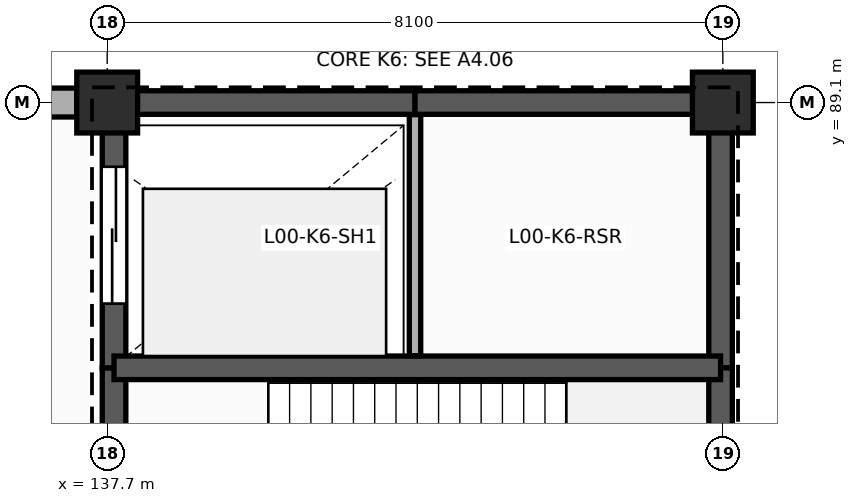
"""IFC4 building model, lengths in metres.
Left out: names, types, materials, properties, quantities, classifications, styles, units other than length and angle.
Written with IfcOpenShell. Run it as: python <this file> out.ifc"""

import sys

from ifc_helpers import new_model, si_unit, direction, frame, frame_2d, origin, origin_2d, place, context, subcontext, project, spatial, rectangle, extrude, element, fill, save


model = new_model("IFC4")
c1 = context("Model", 3, precision=1e-05, world=origin(), true_north=direction((0.0, 1.0)))
c2 = subcontext(c1, "Body", "Model", "MODEL_VIEW")
j1 = project(units=[si_unit("LENGTHUNIT", "METRE"), si_unit("PLANEANGLEUNIT", "RADIAN")], contexts=[c1])
p1 = place(None, origin())
s1 = spatial("IfcSite", under=j1, at=p1, CompositionType="ELEMENT")
p2 = place(p1, origin())
s2 = spatial("IfcBuilding", under=s1, at=p2, CompositionType="ELEMENT")
p3 = place(p2, origin())
s3 = spatial("IfcBuildingStorey", under=s2, at=p3, CompositionType="ELEMENT", Elevation=0.0)
for number, where, z_axis, x_axis in (
    (1, (137.7, 89.1, 0.0), (0.0, 0.0, 1.0), (1.0, 0.0, 0.0)),
    (2, (145.8, 89.1, 0.0), (0.0, 0.0, 1.0), (1.0, 0.0, 0.0)),
):
    element("IfcColumn", number, at=place(p3, frame(where, z_axis=z_axis, x_axis=x_axis)), inside=s3, PredefinedType="COLUMN", context=c2, shape_type="SweptSolid", body=[
        extrude(rectangle(XDim=0.8, YDim=0.8, at=origin_2d()), origin(), (0.0, 0.0, 1.0), 5.4),
    ])
p4 = place(p3, frame((130.0, 89.1, 0.0), z_axis=(0.0, 0.0, 1.0), x_axis=(1.0, 0.0, 0.0)))
e3 = element("IfcWall", 3, at=p4, inside=s3, PredefinedType="SOLIDWALL", context=c2, shape_type="SweptSolid", body=[
    extrude(rectangle(XDim=7.3, YDim=0.38, at=frame_2d((3.65, 0.0))), origin(), (0.0, 0.0, 1.0), 4.707),
])
p5 = place(p3, frame((137.79, 81.25, 0.0), z_axis=(0.0, 0.0, 1.0), x_axis=(0.0, 1.0, 0.0)))
e4 = element("IfcWall", 4, at=p5, inside=s3, PredefinedType="SHEAR", context=c2, shape_type="SweptSolid", body=[
    extrude(rectangle(XDim=4.36, YDim=0.31, at=frame_2d((2.18, 0.0))), origin(), (0.0, 0.0, 1.0), 5.4),
])
p6 = place(p5, frame((1.35, 0.0, 0.0)))
e5 = element("IfcOpeningElement", 5, at=p6, cuts=e4, PredefinedType="OPENING", context=c2, shape_type="SweptSolid", body=[
    extrude(rectangle(XDim=1.2, YDim=2.25, at=frame_2d((0.6, 1.125))), frame((0.0, 0.165, 0.0), z_axis=(0.0, -1.0, 0.0), x_axis=(1.0, 0.0, 0.0)), (0.0, 0.0, 1.0), 0.33),
])
p7 = place(p3, frame((137.79, 85.61, 0.0), z_axis=(0.0, 0.0, 1.0), x_axis=(0.0, 1.0, 0.0)))
e6 = element("IfcWall", 6, at=p7, inside=s3, PredefinedType="SHEAR", context=c2, shape_type="SweptSolid", body=[
    extrude(rectangle(XDim=3.49, YDim=0.31, at=frame_2d((1.745, 0.0))), origin(), (0.0, 0.0, 1.0), 5.4),
])
p8 = place(p7, frame((0.845, 0.0, 0.0)))
e7 = element("IfcOpeningElement", 7, at=p8, cuts=e6, PredefinedType="OPENING", context=c2, shape_type="SweptSolid", body=[
    extrude(rectangle(XDim=1.8, YDim=2.4, at=frame_2d((0.9, 1.2))), frame((0.0, 0.165, 0.0), z_axis=(0.0, -1.0, 0.0), x_axis=(1.0, 0.0, 0.0)), (0.0, 0.0, 1.0), 0.33),
])
p9 = place(p3, frame((137.79, 89.1, 0.0), z_axis=(0.0, 0.0, 1.0), x_axis=(1.0, 0.0, 0.0)))
e8 = element("IfcWall", 8, at=p9, inside=s3, PredefinedType="SHEAR", context=c2, shape_type="SweptSolid", body=[
    extrude(rectangle(XDim=3.96, YDim=0.31, at=frame_2d((1.98, 0.0))), origin(), (0.0, 0.0, 1.0), 5.4),
])
p10 = place(p3, frame((141.75, 89.1, 0.0), z_axis=(0.0, 0.0, 1.0), x_axis=(1.0, 0.0, 0.0)))
e9 = element("IfcWall", 9, at=p10, inside=s3, PredefinedType="SHEAR", context=c2, shape_type="SweptSolid", body=[
    extrude(rectangle(XDim=4.02, YDim=0.31, at=frame_2d((2.01, 0.0))), origin(), (0.0, 0.0, 1.0), 5.4),
])
p11 = place(p3, frame((145.77, 89.1, 0.0), z_axis=(0.0, 0.0, 1.0), x_axis=(0.0, -1.0, 0.0)))
e10 = element("IfcWall", 10, at=p11, inside=s3, PredefinedType="SHEAR", context=c2, shape_type="SweptSolid", body=[
    extrude(rectangle(XDim=3.49, YDim=0.31, at=frame_2d((1.745, 0.0))), origin(), (0.0, 0.0, 1.0), 5.4),
])
p12 = place(p3, frame((145.77, 85.61, 0.0), z_axis=(0.0, 0.0, 1.0), x_axis=(0.0, -1.0, 0.0)))
e11 = element("IfcWall", 11, at=p12, inside=s3, PredefinedType="SHEAR", context=c2, shape_type="SweptSolid", body=[
    extrude(rectangle(XDim=4.36, YDim=0.31, at=frame_2d((2.18, 0.0))), origin(), (0.0, 0.0, 1.0), 5.4),
])
p13 = place(p3, frame((137.79, 85.61, 0.0), z_axis=(0.0, 0.0, 1.0), x_axis=(1.0, 0.0, 0.0)))
e12 = element("IfcWall", 12, at=p13, inside=s3, PredefinedType="SHEAR", context=c2, shape_type="SweptSolid", body=[
    extrude(rectangle(XDim=7.98, YDim=0.31, at=frame_2d((3.99, 0.0))), origin(), (0.0, 0.0, 1.0), 5.4),
])
p14 = place(p3, frame((141.75, 85.77, 0.0), z_axis=(0.0, 0.0, 1.0), x_axis=(0.0, 1.0, 0.0)))
e13 = element("IfcWall", 13, at=p14, inside=s3, PredefinedType="PLUMBINGWALL", context=c2, shape_type="SweptSolid", body=[
    extrude(rectangle(XDim=3.17, YDim=0.15, at=frame_2d((1.585, 0.0))), origin(), (0.0, 0.0, 1.0), 5.05),
])
p15 = place(p8, origin())
e14 = element("IfcDoor", 14, at=p15, inside=s3, OperationType="SLIDING_TO_LEFT", PredefinedType="DOOR", context=c2, shape_type="SweptSolid", body=[
    extrude(rectangle(XDim=1.8, YDim=2.4, at=frame_2d((0.9, 1.2))), frame((0.0, 0.025, 0.0), z_axis=(0.0, -1.0, 0.0), x_axis=(1.0, 0.0, 0.0)), (0.0, 0.0, 1.0), 0.05),
])
fill(e7, e14)
save(model, sys.argv[1])
